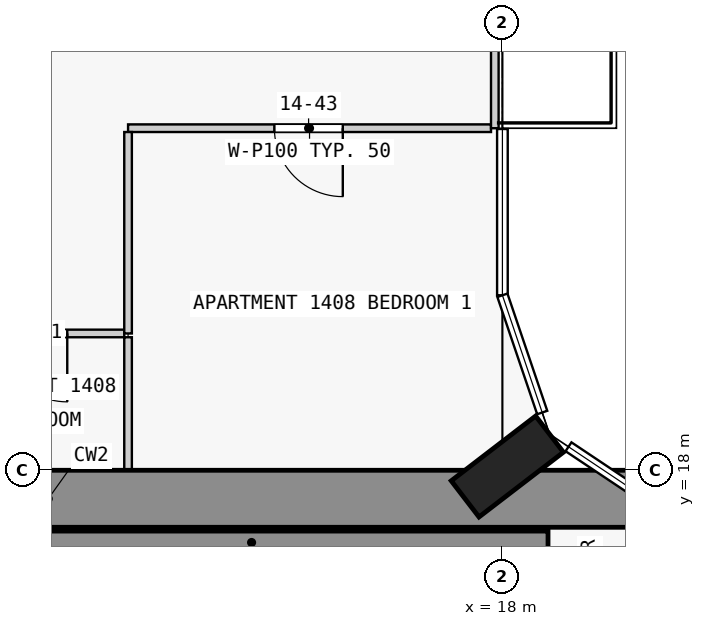
"""IFC4 building model, lengths in metres.
Left out: names, types, materials, properties, quantities, classifications, styles, units other than length and angle.
Written with IfcOpenShell. Run it as: python <this file> out.ifc"""

import sys

from ifc_helpers import new_model, si_unit, direction, frame, frame_2d, origin, origin_2d, place, context, subcontext, project, spatial, rectangle, extrude, element, fill, save


model = new_model("IFC4")
c1 = context("Model", 3, precision=1e-05, world=origin(), true_north=direction((0.0, 1.0)))
c2 = subcontext(c1, "Body", "Model", "MODEL_VIEW")
j1 = project(units=[si_unit("LENGTHUNIT", "METRE"), si_unit("PLANEANGLEUNIT", "RADIAN")], contexts=[c1])
p1 = place(None, origin())
s1 = spatial("IfcSite", under=j1, at=p1, CompositionType="ELEMENT")
p2 = place(p1, origin())
s2 = spatial("IfcBuilding", under=s1, at=p2, CompositionType="ELEMENT")
p3 = place(p2, frame((0.0, 0.0, 58.3)))
s3 = spatial("IfcBuildingStorey", under=s2, at=p3, CompositionType="ELEMENT", Elevation=58.3)
p4 = place(p3, frame((18.065, 18.05, 0.0), z_axis=(0.0, 0.0, 1.0), x_axis=(-0.608810846443, 0.793315418515, 0.0)))
e1 = element("IfcColumn", 1, at=p4, inside=s3, PredefinedType="COLUMN", context=c2, shape_type="SweptSolid", body=[
    extrude(rectangle(XDim=0.6, YDim=1.4, at=origin_2d()), origin(), (0.0, 0.0, 1.0), 3.5),
])
p5 = place(p3, frame((1.55, 17.625, 0.0), z_axis=(0.0, 0.0, 1.0), x_axis=(1.0, 0.0, 0.0)))
e2 = element("IfcWall", 2, at=p5, inside=s3, PredefinedType="SHEAR", context=c2, shape_type="SweptSolid", body=[
    extrude(rectangle(XDim=20.95, YDim=0.75, at=frame_2d((10.475, 0.0))), origin(), (0.0, 0.0, 1.0), 3.25),
])
p6 = place(p5, frame((6.55, 0.0, 0.0)))
e3 = element("IfcOpeningElement", 3, at=p6, cuts=e2, PredefinedType="OPENING", context=c2, shape_type="SweptSolid", body=[
    extrude(rectangle(XDim=1.8, YDim=2.1, at=frame_2d((0.9, 1.05))), frame((0.0, 0.385, 0.0), z_axis=(0.0, -1.0, 0.0), x_axis=(1.0, 0.0, 0.0)), (0.0, 0.0, 1.0), 0.77),
])
p7 = place(p3, frame((10.8, 17.05, 0.0), z_axis=(0.0, 0.0, 1.0), x_axis=(1.0, 0.0, 0.0)))
e4 = element("IfcWall", 4, at=p7, inside=s3, PredefinedType="SHEAR", context=c2, shape_type="SweptSolid", body=[
    extrude(rectangle(XDim=7.8, YDim=0.3, at=frame_2d((3.9, 0.0))), origin(), (0.0, 0.0, 1.0), 3.25),
])
p8 = place(p3, frame((17.9, 27.0, 0.0), z_axis=(0.0, 0.0, 1.0), x_axis=(0.0, -1.0, 0.0)))
e5 = element("IfcWall", 5, at=p8, inside=s3, PredefinedType="STANDARD", context=c2, shape_type="SweptSolid", body=[
    extrude(rectangle(XDim=4.5, YDim=0.1, at=frame_2d((2.25, 0.0))), origin(), (0.0, 0.0, 1.0), 3.25),
])
p9 = place(p8, frame((1.05, 0.0, 0.0)))
e6 = element("IfcOpeningElement", 6, at=p9, cuts=e5, PredefinedType="OPENING", context=c2, shape_type="SweptSolid", body=[
    extrude(rectangle(XDim=2.4, YDim=2.4, at=frame_2d((1.2, 1.2))), frame((0.0, 0.06, 0.0), z_axis=(0.0, -1.0, 0.0), x_axis=(1.0, 0.0, 0.0)), (0.0, 0.0, 1.0), 0.12),
])
p10 = place(p3, frame((13.025, 19.8, 0.0), z_axis=(0.0, 0.0, 1.0), x_axis=(-1.0, 0.0, 0.0)))
e7 = element("IfcWall", 7, at=p10, inside=s3, PredefinedType="PARTITIONING", context=c2, shape_type="SweptSolid", body=[
    extrude(rectangle(XDim=2.35, YDim=0.1, at=frame_2d((1.175, 0.0))), origin(), (0.0, 0.0, 1.0), 3.25),
])
p11 = place(p10, frame((0.75, 0.0, 0.0)))
e8 = element("IfcOpeningElement", 8, at=p11, cuts=e7, PredefinedType="OPENING", context=c2, shape_type="SweptSolid", body=[
    extrude(rectangle(XDim=0.9, YDim=2.1, at=frame_2d((0.45, 1.05))), frame((0.0, 0.06, 0.0), z_axis=(0.0, -1.0, 0.0), x_axis=(1.0, 0.0, 0.0)), (0.0, 0.0, 1.0), 0.12),
])
p12 = place(p3, frame((17.85, 22.5, 0.0), z_axis=(0.0, 0.0, 1.0), x_axis=(-1.0, 0.0, 0.0)))
e9 = element("IfcWall", 9, at=p12, inside=s3, PredefinedType="PARTITIONING", context=c2, shape_type="SweptSolid", body=[
    extrude(rectangle(XDim=4.775, YDim=0.1, at=frame_2d((2.388, 0.0))), origin(), (0.0, 0.0, 1.0), 3.25),
])
p13 = place(p12, frame((1.95, 0.0, 0.0)))
e10 = element("IfcOpeningElement", 10, at=p13, cuts=e9, PredefinedType="OPENING", context=c2, shape_type="SweptSolid", body=[
    extrude(rectangle(XDim=0.9, YDim=2.1, at=frame_2d((0.45, 1.05))), frame((0.0, 0.06, 0.0), z_axis=(0.0, -1.0, 0.0), x_axis=(1.0, 0.0, 0.0)), (0.0, 0.0, 1.0), 0.12),
])
p14 = place(p3, frame((13.075, 22.45, 0.0), z_axis=(0.0, 0.0, 1.0), x_axis=(0.0, -1.0, 0.0)))
e11 = element("IfcWall", 11, at=p14, inside=s3, PredefinedType="PARTITIONING", context=c2, shape_type="SweptSolid", body=[
    extrude(rectangle(XDim=2.65, YDim=0.1, at=frame_2d((1.325, 0.0))), origin(), (0.0, 0.0, 1.0), 3.25),
])
p15 = place(p3, frame((13.075, 18.0, 0.0), z_axis=(0.0, 0.0, 1.0), x_axis=(0.0, 1.0, 0.0)))
e12 = element("IfcWall", 12, at=p15, inside=s3, PredefinedType="PARTITIONING", context=c2, shape_type="SweptSolid", body=[
    extrude(rectangle(XDim=1.75, YDim=0.1, at=frame_2d((0.875, 0.0))), origin(), (0.0, 0.0, 1.0), 3.25),
])
p16 = place(p11, origin())
e13 = element("IfcDoor", 13, at=p16, inside=s3, OperationType="SINGLE_SWING_RIGHT", PredefinedType="DOOR", context=c2, shape_type="SweptSolid", body=[
    extrude(rectangle(XDim=0.9, YDim=2.1, at=frame_2d((0.45, 1.05))), frame((0.0, 0.025, 0.0), z_axis=(0.0, -1.0, 0.0), x_axis=(1.0, 0.0, 0.0)), (0.0, 0.0, 1.0), 0.05),
])
fill(e8, e13)
p17 = place(p13, origin())
e14 = element("IfcDoor", 14, at=p17, inside=s3, OperationType="SINGLE_SWING_RIGHT", PredefinedType="DOOR", context=c2, shape_type="SweptSolid", body=[
    extrude(rectangle(XDim=0.9, YDim=2.1, at=frame_2d((0.45, 1.05))), frame((0.0, 0.025, 0.0), z_axis=(0.0, -1.0, 0.0), x_axis=(1.0, 0.0, 0.0)), (0.0, 0.0, 1.0), 0.05),
])
fill(e10, e14)
save(model, sys.argv[1])
